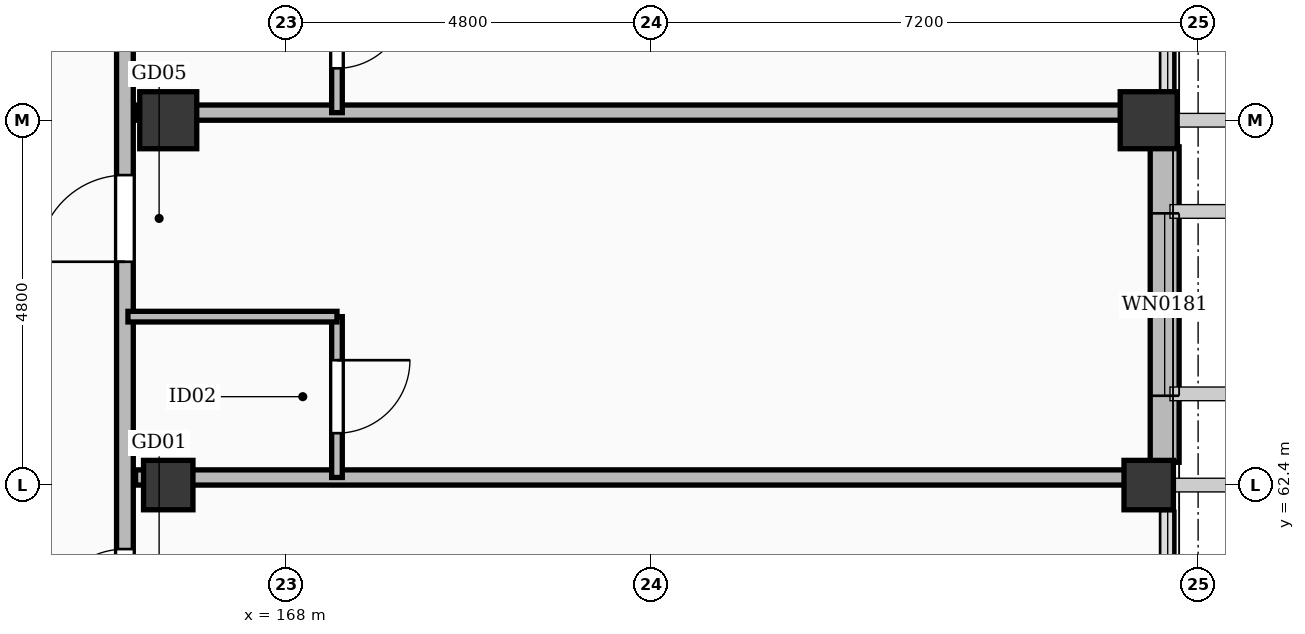
"""IFC4 building model, lengths in metres.
Left out: names, types, materials, properties, quantities, classifications, styles, units other than length and angle.
Written with IfcOpenShell. Run it as: python <this file> out.ifc"""

import sys

from ifc_helpers import new_model, si_unit, direction, frame, frame_2d, origin, origin_2d, place, context, subcontext, project, spatial, rectangle, extrude, element, fill, save


model = new_model("IFC4")
c1 = context("Model", 3, precision=1e-05, world=origin(), true_north=direction((0.0, 1.0)))
c2 = subcontext(c1, "Body", "Model", "MODEL_VIEW")
j1 = project(units=[si_unit("LENGTHUNIT", "METRE"), si_unit("PLANEANGLEUNIT", "RADIAN")], contexts=[c1])
p1 = place(None, origin())
s1 = spatial("IfcSite", under=j1, at=p1, CompositionType="ELEMENT")
p2 = place(p1, origin())
s2 = spatial("IfcBuilding", under=s1, at=p2, CompositionType="ELEMENT")
p3 = place(p2, frame((0.0, 0.0, 28.2)))
s3 = spatial("IfcBuildingStorey", under=s2, at=p3, CompositionType="ELEMENT", Elevation=28.2)
for number, where, z_axis, x_axis in (
    (1, (166.45, 67.2, 0.0), (0.0, 0.0, 1.0), (1.0, 0.0, 0.0)),
    (2, (179.35, 67.2, 0.0), (0.0, 0.0, 1.0), (1.0, 0.0, 0.0)),
):
    element("IfcColumn", number, at=place(p3, frame(where, z_axis=z_axis, x_axis=x_axis)), inside=s3, PredefinedType="COLUMN", context=c2, shape_type="SweptSolid", body=[
        extrude(rectangle(XDim=0.75, YDim=0.75, at=origin_2d()), origin(), (0.0, 0.0, 1.0), 3.6),
    ])
for number, where, z_axis, x_axis in (
    (3, (166.45, 62.4, 0.0), (0.0, 0.0, 1.0), (1.0, 0.0, 0.0)),
    (4, (179.35, 62.4, 0.0), (0.0, 0.0, 1.0), (1.0, 0.0, 0.0)),
):
    element("IfcColumn", number, at=place(p3, frame(where, z_axis=z_axis, x_axis=x_axis)), inside=s3, PredefinedType="COLUMN", context=c2, shape_type="SweptSolid", body=[
        extrude(rectangle(XDim=0.65, YDim=0.65, at=origin_2d()), origin(), (0.0, 0.0, 1.0), 3.6),
    ])
p4 = place(p3, frame((179.56, 66.85, 0.0), z_axis=(0.0, 0.0, 1.0), x_axis=(0.0, -1.0, 0.0)))
e5 = element("IfcWall", 5, at=p4, inside=s3, PredefinedType="SOLIDWALL", context=c2, shape_type="SweptSolid", body=[
    extrude(rectangle(XDim=4.15, YDim=0.38, at=frame_2d((2.075, 0.0))), origin(), (0.0, 0.0, 1.0), 2.582),
])
p5 = place(p4, frame((0.875, 0.0, 0.55)))
e6 = element("IfcOpeningElement", 6, at=p5, cuts=e5, PredefinedType="OPENING", context=c2, shape_type="SweptSolid", body=[
    extrude(rectangle(XDim=2.4, YDim=1.8, at=frame_2d((1.2, 0.9))), frame((0.0, 0.202, 0.0), z_axis=(0.0, -1.0, 0.0), x_axis=(1.0, 0.0, 0.0)), (0.0, 0.0, 1.0), 0.404),
])
p6 = place(p3, frame((165.88, 38.75, 0.0), z_axis=(0.0, 0.0, 1.0), x_axis=(0.0, 1.0, 0.0)))
e7 = element("IfcWall", 7, at=p6, inside=s3, PredefinedType="PARTITIONING", context=c2, shape_type="SweptSolid", body=[
    extrude(rectangle(XDim=86.9, YDim=0.22, at=frame_2d((43.45, 0.0))), origin(), (0.0, 0.0, 1.0), 2.582),
])
p7 = place(p6, frame((0.691, 0.0, 0.0)))
e8 = element("IfcOpeningElement", 8, at=p7, cuts=e7, PredefinedType="OPENING", context=c2, shape_type="SweptSolid", body=[
    extrude(rectangle(XDim=0.98, YDim=2.15, at=frame_2d((0.49, 1.075))), frame((0.0, 0.122, 0.0), z_axis=(0.0, -1.0, 0.0), x_axis=(1.0, 0.0, 0.0)), (0.0, 0.0, 1.0), 0.244),
])
p8 = place(p6, frame((7.038, 0.0, 0.0)))
e9 = element("IfcOpeningElement", 9, at=p8, cuts=e7, PredefinedType="OPENING", context=c2, shape_type="SweptSolid", body=[
    extrude(rectangle(XDim=1.28, YDim=2.16, at=frame_2d((0.64, 1.08))), frame((0.0, 0.122, 0.0), z_axis=(0.0, -1.0, 0.0), x_axis=(1.0, 0.0, 0.0)), (0.0, 0.0, 1.0), 0.244),
])
p9 = place(p6, frame((12.188, 0.0, 0.0)))
e10 = element("IfcOpeningElement", 10, at=p9, cuts=e7, PredefinedType="OPENING", context=c2, shape_type="SweptSolid", body=[
    extrude(rectangle(XDim=0.9, YDim=2.08, at=frame_2d((0.45, 1.04))), frame((0.0, 0.122, 0.0), z_axis=(0.0, -1.0, 0.0), x_axis=(1.0, 0.0, 0.0)), (0.0, 0.0, 1.0), 0.244),
])
p10 = place(p6, frame((16.988, 0.0, 0.0)))
e11 = element("IfcOpeningElement", 11, at=p10, cuts=e7, PredefinedType="OPENING", context=c2, shape_type="SweptSolid", body=[
    extrude(rectangle(XDim=1.05, YDim=2.22, at=frame_2d((0.525, 1.11))), frame((0.0, 0.122, 0.0), z_axis=(0.0, -1.0, 0.0), x_axis=(1.0, 0.0, 0.0)), (0.0, 0.0, 1.0), 0.244),
])
p11 = place(p6, frame((21.788, 0.0, 0.0)))
e12 = element("IfcOpeningElement", 12, at=p11, cuts=e7, PredefinedType="OPENING", context=c2, shape_type="SweptSolid", body=[
    extrude(rectangle(XDim=1.02, YDim=2.2, at=frame_2d((0.51, 1.1))), frame((0.0, 0.122, 0.0), z_axis=(0.0, -1.0, 0.0), x_axis=(1.0, 0.0, 0.0)), (0.0, 0.0, 1.0), 0.244),
])
p12 = place(p6, frame((26.588, 0.0, 0.0)))
e13 = element("IfcOpeningElement", 13, at=p12, cuts=e7, PredefinedType="OPENING", context=c2, shape_type="SweptSolid", body=[
    extrude(rectangle(XDim=1.14, YDim=2.26, at=frame_2d((0.57, 1.13))), frame((0.0, 0.122, 0.0), z_axis=(0.0, -1.0, 0.0), x_axis=(1.0, 0.0, 0.0)), (0.0, 0.0, 1.0), 0.244),
])
p13 = place(p6, frame((31.388, 0.0, 0.0)))
e14 = element("IfcOpeningElement", 14, at=p13, cuts=e7, PredefinedType="OPENING", context=c2, shape_type="SweptSolid", body=[
    extrude(rectangle(XDim=0.98, YDim=2.15, at=frame_2d((0.49, 1.075))), frame((0.0, 0.122, 0.0), z_axis=(0.0, -1.0, 0.0), x_axis=(1.0, 0.0, 0.0)), (0.0, 0.0, 1.0), 0.244),
])
p14 = place(p6, frame((35.838, 0.0, 0.0)))
e15 = element("IfcOpeningElement", 15, at=p14, cuts=e7, PredefinedType="OPENING", context=c2, shape_type="SweptSolid", body=[
    extrude(rectangle(XDim=1.28, YDim=2.16, at=frame_2d((0.64, 1.08))), frame((0.0, 0.122, 0.0), z_axis=(0.0, -1.0, 0.0), x_axis=(1.0, 0.0, 0.0)), (0.0, 0.0, 1.0), 0.244),
])
p15 = place(p6, frame((40.988, 0.0, 0.0)))
e16 = element("IfcOpeningElement", 16, at=p15, cuts=e7, PredefinedType="OPENING", context=c2, shape_type="SweptSolid", body=[
    extrude(rectangle(XDim=0.9, YDim=2.08, at=frame_2d((0.45, 1.04))), frame((0.0, 0.122, 0.0), z_axis=(0.0, -1.0, 0.0), x_axis=(1.0, 0.0, 0.0)), (0.0, 0.0, 1.0), 0.244),
])
p16 = place(p6, frame((45.788, 0.0, 0.0)))
e17 = element("IfcOpeningElement", 17, at=p16, cuts=e7, PredefinedType="OPENING", context=c2, shape_type="SweptSolid", body=[
    extrude(rectangle(XDim=1.05, YDim=2.22, at=frame_2d((0.525, 1.11))), frame((0.0, 0.122, 0.0), z_axis=(0.0, -1.0, 0.0), x_axis=(1.0, 0.0, 0.0)), (0.0, 0.0, 1.0), 0.244),
])
p17 = place(p6, frame((50.588, 0.0, 0.0)))
e18 = element("IfcOpeningElement", 18, at=p17, cuts=e7, PredefinedType="OPENING", context=c2, shape_type="SweptSolid", body=[
    extrude(rectangle(XDim=1.02, YDim=2.2, at=frame_2d((0.51, 1.1))), frame((0.0, 0.122, 0.0), z_axis=(0.0, -1.0, 0.0), x_axis=(1.0, 0.0, 0.0)), (0.0, 0.0, 1.0), 0.244),
])
p18 = place(p6, frame((55.388, 0.0, 0.0)))
e19 = element("IfcOpeningElement", 19, at=p18, cuts=e7, PredefinedType="OPENING", context=c2, shape_type="SweptSolid", body=[
    extrude(rectangle(XDim=1.14, YDim=2.26, at=frame_2d((0.57, 1.13))), frame((0.0, 0.122, 0.0), z_axis=(0.0, -1.0, 0.0), x_axis=(1.0, 0.0, 0.0)), (0.0, 0.0, 1.0), 0.244),
])
p19 = place(p6, frame((60.188, 0.0, 0.0)))
e20 = element("IfcOpeningElement", 20, at=p19, cuts=e7, PredefinedType="OPENING", context=c2, shape_type="SweptSolid", body=[
    extrude(rectangle(XDim=0.98, YDim=2.15, at=frame_2d((0.49, 1.075))), frame((0.0, 0.122, 0.0), z_axis=(0.0, -1.0, 0.0), x_axis=(1.0, 0.0, 0.0)), (0.0, 0.0, 1.0), 0.244),
])
p20 = place(p6, frame((64.638, 0.0, 0.0)))
e21 = element("IfcOpeningElement", 21, at=p20, cuts=e7, PredefinedType="OPENING", context=c2, shape_type="SweptSolid", body=[
    extrude(rectangle(XDim=1.28, YDim=2.16, at=frame_2d((0.64, 1.08))), frame((0.0, 0.122, 0.0), z_axis=(0.0, -1.0, 0.0), x_axis=(1.0, 0.0, 0.0)), (0.0, 0.0, 1.0), 0.244),
])
p21 = place(p6, frame((69.788, 0.0, 0.0)))
e22 = element("IfcOpeningElement", 22, at=p21, cuts=e7, PredefinedType="OPENING", context=c2, shape_type="SweptSolid", body=[
    extrude(rectangle(XDim=0.9, YDim=2.08, at=frame_2d((0.45, 1.04))), frame((0.0, 0.122, 0.0), z_axis=(0.0, -1.0, 0.0), x_axis=(1.0, 0.0, 0.0)), (0.0, 0.0, 1.0), 0.244),
])
p22 = place(p6, frame((74.588, 0.0, 0.0)))
e23 = element("IfcOpeningElement", 23, at=p22, cuts=e7, PredefinedType="OPENING", context=c2, shape_type="SweptSolid", body=[
    extrude(rectangle(XDim=1.05, YDim=2.22, at=frame_2d((0.525, 1.11))), frame((0.0, 0.122, 0.0), z_axis=(0.0, -1.0, 0.0), x_axis=(1.0, 0.0, 0.0)), (0.0, 0.0, 1.0), 0.244),
])
p23 = place(p6, frame((79.388, 0.0, 0.0)))
e24 = element("IfcOpeningElement", 24, at=p23, cuts=e7, PredefinedType="OPENING", context=c2, shape_type="SweptSolid", body=[
    extrude(rectangle(XDim=1.02, YDim=2.2, at=frame_2d((0.51, 1.1))), frame((0.0, 0.122, 0.0), z_axis=(0.0, -1.0, 0.0), x_axis=(1.0, 0.0, 0.0)), (0.0, 0.0, 1.0), 0.244),
])
p24 = place(p6, frame((84.188, 0.0, 0.0)))
e25 = element("IfcOpeningElement", 25, at=p24, cuts=e7, PredefinedType="OPENING", context=c2, shape_type="SweptSolid", body=[
    extrude(rectangle(XDim=1.14, YDim=2.26, at=frame_2d((0.57, 1.13))), frame((0.0, 0.122, 0.0), z_axis=(0.0, -1.0, 0.0), x_axis=(1.0, 0.0, 0.0)), (0.0, 0.0, 1.0), 0.244),
])
p25 = place(p3, frame((166.02, 62.5, 0.0), z_axis=(0.0, 0.0, 1.0), x_axis=(1.0, 0.0, 0.0)))
e26 = element("IfcWall", 26, at=p25, inside=s3, PredefinedType="PARTITIONING", context=c2, shape_type="SweptSolid", body=[
    extrude(rectangle(XDim=13.23, YDim=0.2, at=frame_2d((6.615, 0.0))), origin(), (0.0, 0.0, 1.0), 2.582),
])
p26 = place(p3, frame((168.67, 62.5, 0.0), z_axis=(0.0, 0.0, 1.0), x_axis=(0.0, 1.0, 0.0)))
e27 = element("IfcWall", 27, at=p26, inside=s3, PredefinedType="PARTITIONING", context=c2, shape_type="SweptSolid", body=[
    extrude(rectangle(XDim=2.116, YDim=0.14, at=frame_2d((1.058, 0.0))), origin(), (0.0, 0.0, 1.0), 2.682),
])
p27 = place(p26, frame((0.583, 0.0, 0.0)))
e28 = element("IfcOpeningElement", 28, at=p27, cuts=e27, PredefinedType="OPENING", context=c2, shape_type="SweptSolid", body=[
    extrude(rectangle(XDim=0.96, YDim=2.12, at=frame_2d((0.48, 1.06))), frame((0.0, 0.082, 0.0), z_axis=(0.0, -1.0, 0.0), x_axis=(1.0, 0.0, 0.0)), (0.0, 0.0, 1.0), 0.164),
])
p28 = place(p3, frame((165.92, 64.616, 0.0), z_axis=(0.0, 0.0, 1.0), x_axis=(1.0, 0.0, 0.0)))
e29 = element("IfcWall", 29, at=p28, inside=s3, PredefinedType="PARTITIONING", context=c2, shape_type="SweptSolid", body=[
    extrude(rectangle(XDim=2.75, YDim=0.14, at=frame_2d((1.375, 0.0))), origin(), (0.0, 0.0, 1.0), 2.682),
])
p29 = place(p3, frame((166.02, 67.3, 0.0), z_axis=(0.0, 0.0, 1.0), x_axis=(1.0, 0.0, 0.0)))
e30 = element("IfcWall", 30, at=p29, inside=s3, PredefinedType="PARTITIONING", context=c2, shape_type="SweptSolid", body=[
    extrude(rectangle(XDim=13.23, YDim=0.2, at=frame_2d((6.615, 0.0))), origin(), (0.0, 0.0, 1.0), 2.582),
])
p30 = place(p3, frame((168.67, 67.3, 0.0), z_axis=(0.0, 0.0, 1.0), x_axis=(0.0, 1.0, 0.0)))
e31 = element("IfcWall", 31, at=p30, inside=s3, PredefinedType="PARTITIONING", context=c2, shape_type="SweptSolid", body=[
    extrude(rectangle(XDim=2.116, YDim=0.14, at=frame_2d((1.058, 0.0))), origin(), (0.0, 0.0, 1.0), 2.682),
])
p31 = place(p30, frame((0.583, 0.0, 0.0)))
e32 = element("IfcOpeningElement", 32, at=p31, cuts=e31, PredefinedType="OPENING", context=c2, shape_type="SweptSolid", body=[
    extrude(rectangle(XDim=0.92, YDim=2.1, at=frame_2d((0.46, 1.05))), frame((0.0, 0.082, 0.0), z_axis=(0.0, -1.0, 0.0), x_axis=(1.0, 0.0, 0.0)), (0.0, 0.0, 1.0), 0.164),
])
p32 = place(p5, origin())
e33 = element("IfcWindow", 33, at=p32, inside=s3, PartitioningType="SINGLE_PANEL", PredefinedType="WINDOW", context=c2, shape_type="SweptSolid", body=[
    extrude(rectangle(XDim=2.4, YDim=1.8, at=frame_2d((1.2, 0.9))), frame((0.0, 0.03, 0.0), z_axis=(0.0, -1.0, 0.0), x_axis=(1.0, 0.0, 0.0)), (0.0, 0.0, 1.0), 0.06),
])
fill(e6, e33)
p33 = place(p11, origin())
e34 = element("IfcDoor", 34, at=p33, inside=s3, OperationType="SINGLE_SWING_LEFT", PredefinedType="DOOR", context=c2, shape_type="SweptSolid", body=[
    extrude(rectangle(XDim=1.02, YDim=2.2, at=frame_2d((0.51, 1.1))), frame((0.0, 0.025, 0.0), z_axis=(0.0, -1.0, 0.0), x_axis=(1.0, 0.0, 0.0)), (0.0, 0.0, 1.0), 0.05),
])
fill(e12, e34)
p34 = place(p12, origin())
e35 = element("IfcDoor", 35, at=p34, inside=s3, OperationType="SINGLE_SWING_LEFT", PredefinedType="DOOR", context=c2, shape_type="SweptSolid", body=[
    extrude(rectangle(XDim=1.14, YDim=2.26, at=frame_2d((0.57, 1.13))), frame((0.0, 0.025, 0.0), z_axis=(0.0, -1.0, 0.0), x_axis=(1.0, 0.0, 0.0)), (0.0, 0.0, 1.0), 0.05),
])
fill(e13, e35)
p35 = place(p27, frame((0.96, 0.0, 0.0), z_axis=(0.0, 0.0, 1.0), x_axis=(-1.0, 0.0, 0.0)))
e36 = element("IfcDoor", 36, at=p35, inside=s3, OperationType="SINGLE_SWING_RIGHT", PredefinedType="DOOR", context=c2, shape_type="SweptSolid", body=[
    extrude(rectangle(XDim=0.96, YDim=2.12, at=frame_2d((0.48, 1.06))), frame((0.0, 0.025, 0.0), z_axis=(0.0, -1.0, 0.0), x_axis=(1.0, 0.0, 0.0)), (0.0, 0.0, 1.0), 0.05),
])
fill(e28, e36)
p36 = place(p31, frame((0.92, 0.0, 0.0), z_axis=(0.0, 0.0, 1.0), x_axis=(-1.0, 0.0, 0.0)))
e37 = element("IfcDoor", 37, at=p36, inside=s3, OperationType="SINGLE_SWING_RIGHT", PredefinedType="DOOR", context=c2, shape_type="SweptSolid", body=[
    extrude(rectangle(XDim=0.92, YDim=2.1, at=frame_2d((0.46, 1.05))), frame((0.0, 0.025, 0.0), z_axis=(0.0, -1.0, 0.0), x_axis=(1.0, 0.0, 0.0)), (0.0, 0.0, 1.0), 0.05),
])
fill(e32, e37)
save(model, sys.argv[1])
